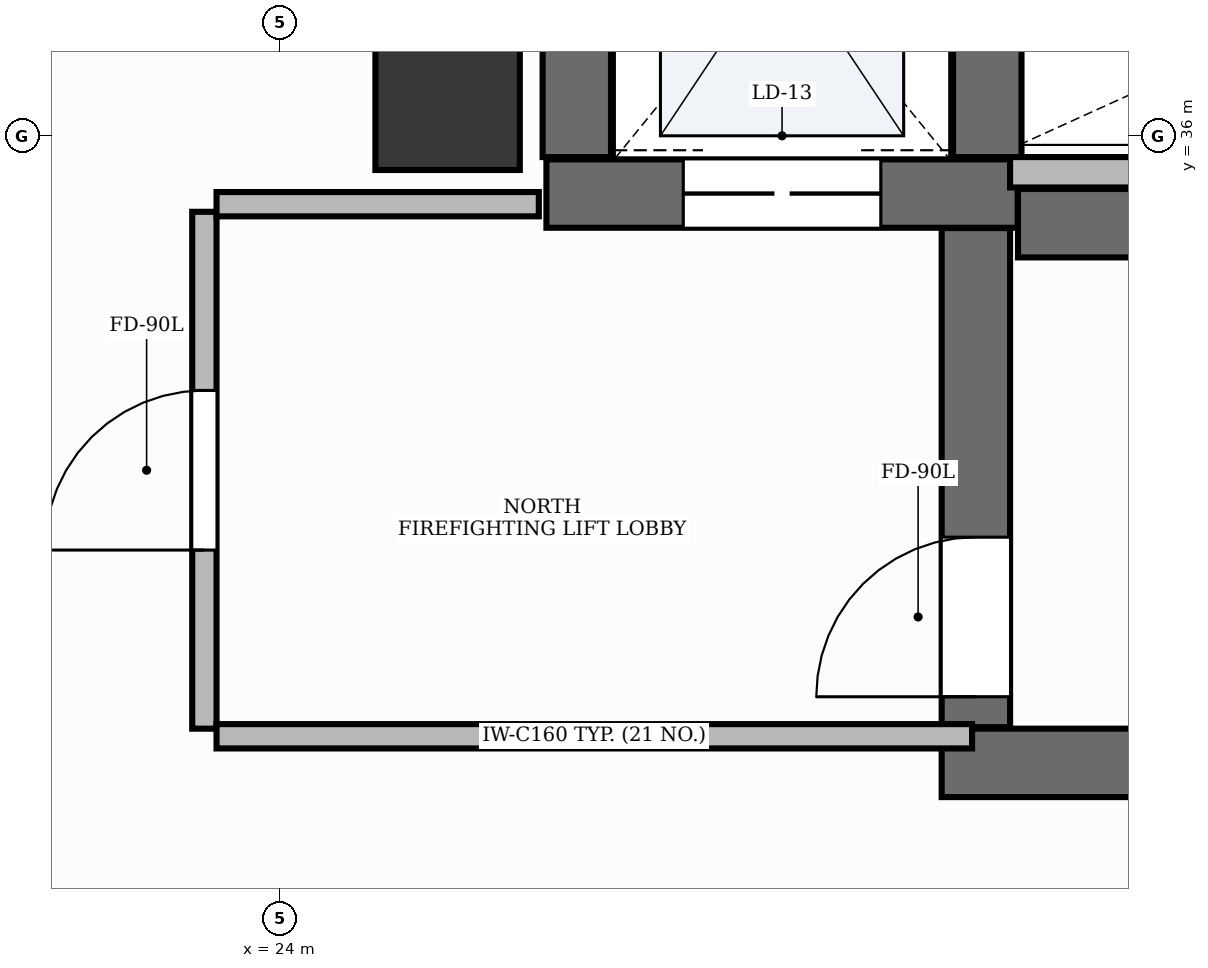
"""IFC4 building model, lengths in metres.
Left out: names, types, materials, properties, quantities, classifications, styles, units other than length and angle.
Written with IfcOpenShell. Run it as: python <this file> out.ifc"""

import sys

from ifc_helpers import new_model, si_unit, direction, frame, frame_2d, origin, origin_2d, place, context, subcontext, project, spatial, rectangle, extrude, element, fill, save


model = new_model("IFC4")
c1 = context("Model", 3, precision=1e-05, world=origin(), true_north=direction((0.0, 1.0)))
c2 = subcontext(c1, "Body", "Model", "MODEL_VIEW")
j1 = project(units=[si_unit("LENGTHUNIT", "METRE"), si_unit("PLANEANGLEUNIT", "RADIAN")], contexts=[c1])
p1 = place(None, origin())
s1 = spatial("IfcSite", under=j1, at=p1, CompositionType="ELEMENT")
p2 = place(p1, origin())
s2 = spatial("IfcBuilding", under=s1, at=p2, CompositionType="ELEMENT")
p3 = place(p2, frame((0.0, 0.0, 90.0)))
s3 = spatial("IfcBuildingStorey", under=s2, at=p3, CompositionType="ELEMENT", Elevation=90.0)
p4 = place(p3, frame((28.852, 35.425, 0.0), z_axis=(0.0, 0.0, 1.0), x_axis=(1.0, 0.0, 0.0)))
e1 = element("IfcWall", 1, at=p4, inside=s3, PredefinedType="SHEAR", context=c2, shape_type="SweptSolid", body=[
    extrude(rectangle(XDim=8.248, YDim=0.45, at=frame_2d((4.124, 0.0))), origin(), (0.0, 0.0, 1.0), 3.9),
])
p5 = place(p3, frame((28.35, 31.875, 0.0), z_axis=(0.0, 0.0, 1.0), x_axis=(1.0, 0.0, 0.0)))
e2 = element("IfcWall", 2, at=p5, inside=s3, PredefinedType="SHEAR", context=c2, shape_type="SweptSolid", body=[
    extrude(rectangle(XDim=8.75, YDim=0.45, at=frame_2d((4.375, 0.0))), origin(), (0.0, 0.0, 1.0), 3.9),
])
p6 = place(p3, frame((28.575, 32.11, 0.0), z_axis=(0.0, 0.0, 1.0), x_axis=(0.0, 1.0, 0.0)))
e3 = element("IfcWall", 3, at=p6, inside=s3, PredefinedType="SHEAR", context=c2, shape_type="SweptSolid", body=[
    extrude(rectangle(XDim=3.283, YDim=0.45, at=frame_2d((1.642, 0.0))), origin(), (0.0, 0.0, 1.0), 3.9),
])
p7 = place(p6, frame((0.2, 0.0, 0.0)))
e4 = element("IfcOpeningElement", 4, at=p7, cuts=e3, PredefinedType="OPENING", context=c2, shape_type="SweptSolid", body=[
    extrude(rectangle(XDim=1.05, YDim=2.15, at=frame_2d((0.525, 1.075))), frame((0.0, 0.24, 0.0), z_axis=(0.0, -1.0, 0.0), x_axis=(1.0, 0.0, 0.0)), (0.0, 0.0, 1.0), 0.48),
])
p8 = place(p3, frame((25.75, 35.62, 0.0), z_axis=(0.0, 0.0, 1.0), x_axis=(1.0, 0.0, 0.0)))
e5 = element("IfcWall", 5, at=p8, inside=s3, PredefinedType="SHEAR", context=c2, shape_type="SweptSolid", body=[
    extrude(rectangle(XDim=3.1, YDim=0.45, at=frame_2d((1.55, 0.0))), origin(), (0.0, 0.0, 1.0), 3.9),
])
p9 = place(p8, frame((0.9, 0.0, 0.0)))
e6 = element("IfcOpeningElement", 6, at=p9, cuts=e5, PredefinedType="OPENING", context=c2, shape_type="SweptSolid", body=[
    extrude(rectangle(XDim=1.3, YDim=2.2, at=frame_2d((0.65, 1.1))), frame((0.0, 0.24, 0.0), z_axis=(0.0, -1.0, 0.0), x_axis=(1.0, 0.0, 0.0)), (0.0, 0.0, 1.0), 0.48),
])
for number, where, z_axis, x_axis in (
    (7, (25.95, 35.86, 0.0), (0.0, 0.0, 1.0), (0.0, 1.0, 0.0)),
    (8, (28.65, 35.86, 0.0), (0.0, 0.0, 1.0), (0.0, 1.0, 0.0)),
):
    element("IfcWall", number, at=place(p3, frame(where, z_axis=z_axis, x_axis=x_axis)), inside=s3, PredefinedType="SHEAR", context=c2, shape_type="SweptSolid", body=[
        extrude(rectangle(XDim=2.7, YDim=0.45, at=frame_2d((1.35, 0.0))), origin(), (0.0, 0.0, 1.0), 3.9),
    ])
p10 = place(p3, frame((25.1, 36.25, -0.0), z_axis=(0.0, 0.0, 1.0), x_axis=(1.0, 0.0, 0.0)))
e9 = element("IfcColumn", 9, at=p10, inside=s3, PredefinedType="PILASTER", context=c2, shape_type="SweptSolid", body=[
    extrude(rectangle(XDim=0.95, YDim=0.95, at=origin_2d()), origin(), (0.0, 0.0, 1.0), 3.901),
])
p11 = place(p3, frame((28.8, 35.76, 0.0), z_axis=(0.0, 0.0, 1.0), x_axis=(1.0, 0.0, 0.0)))
e10 = element("IfcWall", 10, at=p11, inside=s3, PredefinedType="PARTITIONING", context=c2, shape_type="SweptSolid", body=[
    extrude(rectangle(XDim=4.57, YDim=0.2, at=frame_2d((2.285, 0.0))), origin(), (0.0, 0.0, 1.0), 2.91),
])
p12 = place(p3, frame((23.5, 32.1, 0.0), z_axis=(0.0, 0.0, 1.0), x_axis=(0.0, 1.0, 0.0)))
e11 = element("IfcWall", 11, at=p12, inside=s3, PredefinedType="PARTITIONING", context=c2, shape_type="SweptSolid", body=[
    extrude(rectangle(XDim=3.4, YDim=0.16, at=frame_2d((1.7, 0.0))), origin(), (0.0, 0.0, 1.0), 2.91),
])
p13 = place(p12, frame((1.175, 0.0, 0.0)))
e12 = element("IfcOpeningElement", 12, at=p13, cuts=e11, PredefinedType="OPENING", context=c2, shape_type="SweptSolid", body=[
    extrude(rectangle(XDim=1.05, YDim=2.15, at=frame_2d((0.525, 1.075))), frame((0.0, 0.095, 0.0), z_axis=(0.0, -1.0, 0.0), x_axis=(1.0, 0.0, 0.0)), (0.0, 0.0, 1.0), 0.19),
])
p14 = place(p3, frame((23.58, 32.05, 0.0), z_axis=(0.0, 0.0, 1.0), x_axis=(1.0, 0.0, 0.0)))
e13 = element("IfcWall", 13, at=p14, inside=s3, PredefinedType="PARTITIONING", context=c2, shape_type="SweptSolid", body=[
    extrude(rectangle(XDim=4.97, YDim=0.16, at=frame_2d((2.485, 0.0))), origin(), (0.0, 0.0, 1.0), 2.91),
])
p15 = place(p3, frame((23.58, 35.55, 0.0), z_axis=(0.0, 0.0, 1.0), x_axis=(1.0, 0.0, 0.0)))
e14 = element("IfcWall", 14, at=p15, inside=s3, PredefinedType="PARTITIONING", context=c2, shape_type="SweptSolid", body=[
    extrude(rectangle(XDim=2.12, YDim=0.16, at=frame_2d((1.06, 0.0))), origin(), (0.0, 0.0, 1.0), 2.91),
])
p16 = place(p7, origin())
e15 = element("IfcDoor", 15, at=p16, inside=s3, OperationType="SINGLE_SWING_LEFT", PredefinedType="DOOR", context=c2, shape_type="SweptSolid", body=[
    extrude(rectangle(XDim=1.05, YDim=2.15, at=frame_2d((0.525, 1.075))), frame((0.0, 0.025, 0.0), z_axis=(0.0, -1.0, 0.0), x_axis=(1.0, 0.0, 0.0)), (0.0, 0.0, 1.0), 0.05),
])
fill(e4, e15)
p17 = place(p9, origin())
e16 = element("IfcDoor", 16, at=p17, inside=s3, OperationType="DOUBLE_DOOR_SLIDING", PredefinedType="DOOR", context=c2, shape_type="SweptSolid", body=[
    extrude(rectangle(XDim=1.3, YDim=2.2, at=frame_2d((0.65, 1.1))), frame((0.0, 0.025, 0.0), z_axis=(0.0, -1.0, 0.0), x_axis=(1.0, 0.0, 0.0)), (0.0, 0.0, 1.0), 0.05),
])
fill(e6, e16)
p18 = place(p13, origin())
e17 = element("IfcDoor", 17, at=p18, inside=s3, OperationType="SINGLE_SWING_LEFT", PredefinedType="DOOR", context=c2, shape_type="SweptSolid", body=[
    extrude(rectangle(XDim=1.05, YDim=2.15, at=frame_2d((0.525, 1.075))), frame((0.0, 0.025, 0.0), z_axis=(0.0, -1.0, 0.0), x_axis=(1.0, 0.0, 0.0)), (0.0, 0.0, 1.0), 0.05),
])
fill(e12, e17)
save(model, sys.argv[1])
